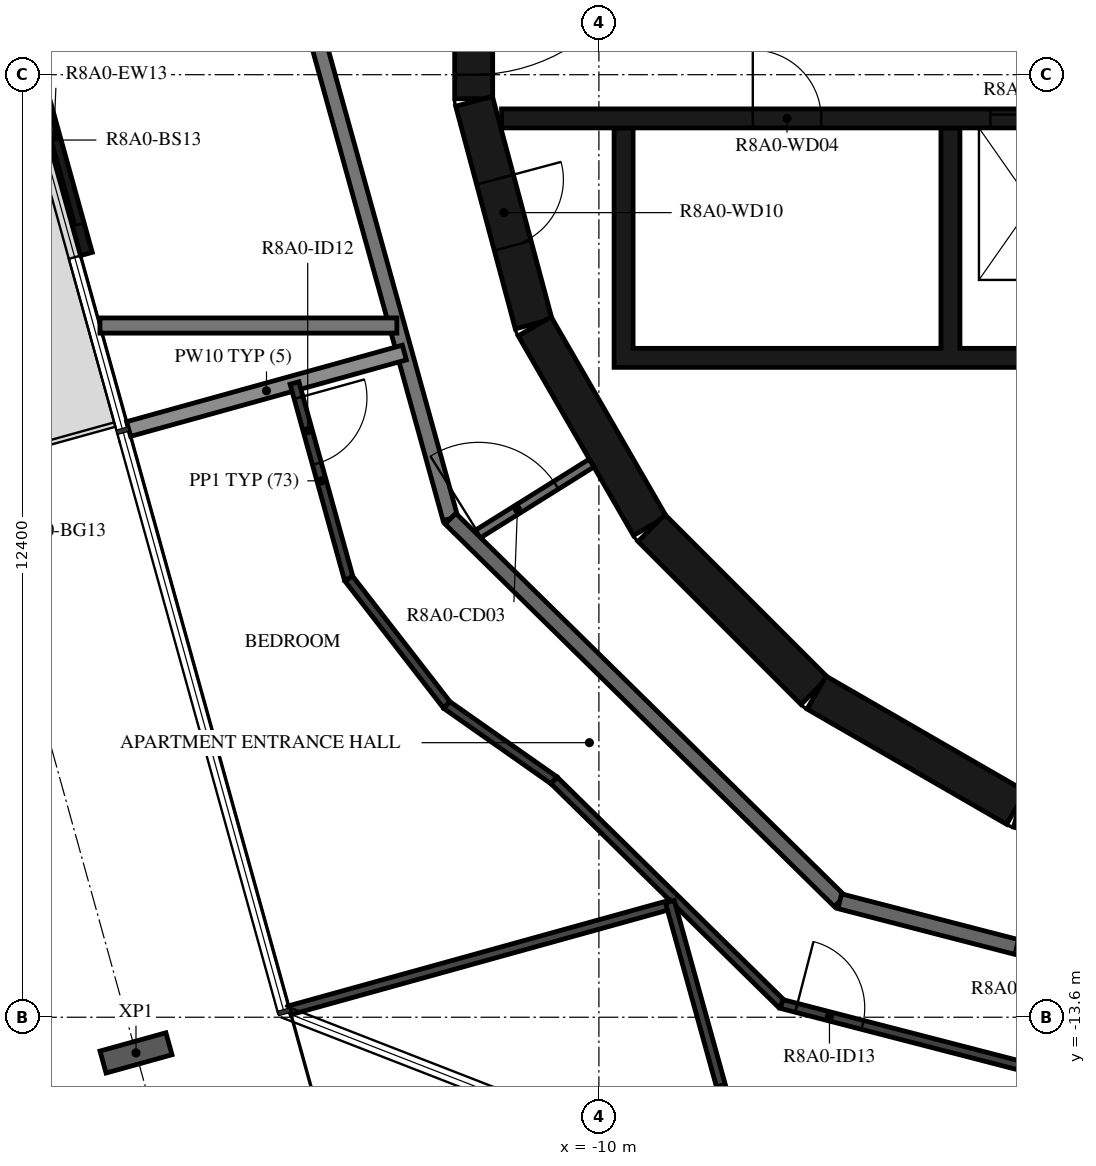
"""IFC4 building model, lengths in metres.
Left out: names, types, materials, properties, quantities, classifications, styles, units other than length and angle.
Written with IfcOpenShell. Run it as: python <this file> out.ifc"""

import sys

from ifc_helpers import new_model, si_unit, direction, frame, frame_2d, origin, origin_2d, place, context, subcontext, project, spatial, polyline, rectangle, i_section, outline, extrude, element, fill, save


model = new_model("IFC4")
c1 = context("Model", 3, precision=1e-05, world=origin(), true_north=direction((0.0, 1.0)))
c2 = subcontext(c1, "Body", "Model", "MODEL_VIEW")
j1 = project(units=[si_unit("LENGTHUNIT", "METRE"), si_unit("PLANEANGLEUNIT", "RADIAN")], contexts=[c1])
p1 = place(None, origin())
s1 = spatial("IfcSite", under=j1, at=p1, CompositionType="ELEMENT")
p2 = place(p1, origin())
s2 = spatial("IfcBuilding", under=s1, at=p2, CompositionType="ELEMENT")
p3 = place(p2, frame((0.0, 0.0, 305.2)))
s3 = spatial("IfcBuildingStorey", under=s2, at=p3, CompositionType="ELEMENT", Elevation=305.2)
p4 = place(p3, frame((-16.09, -14.069, -0.38), z_axis=(0.0, 0.0, 1.0), x_axis=(-0.267238143562, 0.963630517691, 0.0)))
e1 = element("IfcColumn", 1, at=p4, inside=s3, PredefinedType="COLUMN", context=c2, shape_type="SweptSolid", body=[
    extrude(i_section(OverallWidth=0.3, OverallDepth=0.9, WebThickness=0.019, FlangeThickness=0.035, FilletRadius=0.03, at=origin_2d()), origin(), (0.0, 0.0, 1.0), 3.5),
])
p5 = place(p3, frame((-17.598, -0.475, 0.0), z_axis=(0.0, 0.0, 1.0), x_axis=(0.267266077957, -0.963622770369, 0.0)))
e2 = element("IfcWall", 2, at=p5, inside=s3, PredefinedType="STANDARD", context=c2, shape_type="SweptSolid", body=[
    extrude(rectangle(XDim=3.2, YDim=0.16, at=frame_2d((1.6, 0.0))), origin(), (0.0, 0.0, 1.0), 3.12),
])
p6 = place(p5, frame((0.4, 0.0, 0.0)))
e3 = element("IfcOpeningElement", 3, at=p6, cuts=e2, PredefinedType="OPENING", context=c2, shape_type="SweptSolid", body=[
    extrude(rectangle(XDim=2.4, YDim=2.4, at=frame_2d((1.2, 1.2))), frame((0.0, 0.09, 0.0), z_axis=(0.0, -1.0, 0.0), x_axis=(1.0, 0.0, 0.0)), (0.0, 0.0, 1.0), 0.18),
])
p7 = place(p3, frame((-11.647, 1.516, 0.0), z_axis=(0.0, 0.0, 1.0), x_axis=(0.0, -1.0, 0.0)))
e4 = element("IfcWall", 4, at=p7, inside=s3, PredefinedType="SHEAR", context=c2, shape_type="SweptSolid", body=[
    extrude(rectangle(XDim=3.033, YDim=0.5, at=frame_2d((1.516, 0.0))), origin(), (0.0, 0.0, 1.0), 3.12),
])
p8 = place(p7, frame((0.316, 0.0, 0.0)))
e5 = element("IfcOpeningElement", 5, at=p8, cuts=e4, PredefinedType="OPENING", context=c2, shape_type="SweptSolid", body=[
    extrude(rectangle(XDim=2.4, YDim=2.1, at=frame_2d((1.2, 1.05))), frame((0.0, 0.26, 0.0), z_axis=(0.0, -1.0, 0.0), x_axis=(1.0, 0.0, 0.0)), (0.0, 0.0, 1.0), 0.52),
])
p9 = place(p3, frame((-11.643, -1.55, 0.0), z_axis=(0.0, 0.0, 1.0), x_axis=(0.258734743916, -0.965948410781, 0.0)))
e6 = element("IfcWall", 6, at=p9, inside=s3, PredefinedType="SHEAR", context=c2, shape_type="SweptSolid", body=[
    extrude(rectangle(XDim=3.033, YDim=0.5, at=frame_2d((1.516, 0.0))), origin(), (0.0, 0.0, 1.0), 3.12),
])
p10 = place(p9, frame((1.066, 0.0, 0.0)))
e7 = element("IfcOpeningElement", 7, at=p10, cuts=e6, PredefinedType="OPENING", context=c2, shape_type="SweptSolid", body=[
    extrude(rectangle(XDim=0.9, YDim=2.1, at=frame_2d((0.45, 1.05))), frame((0.0, 0.26, 0.0), z_axis=(0.0, -1.0, 0.0), x_axis=(1.0, 0.0, 0.0)), (0.0, 0.0, 1.0), 0.52),
])
p11 = place(p3, frame((-10.845, -4.51, 0.0), z_axis=(0.0, 0.0, 1.0), x_axis=(0.500087131594, -0.865975092491, 0.0)))
e8 = element("IfcWall", 8, at=p11, inside=s3, PredefinedType="SHEAR", context=c2, shape_type="SweptSolid", body=[
    extrude(rectangle(XDim=3.033, YDim=0.5, at=frame_2d((1.516, 0.0))), origin(), (0.0, 0.0, 1.0), 3.12),
])
p12 = place(p3, frame((-9.308, -7.164, 0.0), z_axis=(0.0, 0.0, 1.0), x_axis=(0.707106781187, -0.707106781187, 0.0)))
e9 = element("IfcWall", 9, at=p12, inside=s3, PredefinedType="SHEAR", context=c2, shape_type="SweptSolid", body=[
    extrude(rectangle(XDim=3.032, YDim=0.5, at=frame_2d((1.516, 0.0))), origin(), (0.0, 0.0, 1.0), 3.12),
])
for number, where, z_axis, x_axis in (
    (10, (-7.137, -9.329, 0.0), (0.0, 0.0, 1.0), (0.866, -0.5, 0.0)),
    (11, (-4.479, -10.858, 0.0), (0.0, 0.0, 1.0), (0.966, -0.259, 0.0)),
):
    element("IfcWall", number, at=place(p3, frame(where, z_axis=z_axis, x_axis=x_axis)), inside=s3, PredefinedType="SHEAR", context=c2, shape_type="SweptSolid", body=[
        extrude(rectangle(XDim=3.033, YDim=0.5, at=frame_2d((1.516, 0.0))), origin(), (0.0, 0.0, 1.0), 3.12),
    ])
p13 = place(p3, origin())
e12 = element("IfcWall", 12, at=p13, inside=s3, PredefinedType="SHEAR", context=c2, shape_type="SweptSolid", body=[
    extrude(outline(polyline([(9.8, -5.05), (9.8, -4.8), (9.8, -1.9), (9.55, -1.9), (9.55, -4.8), (7.65, -4.8), (7.65, -1.9), (7.4, -1.9), (7.4, -4.8), (5.5, -4.8), (5.5, -1.9), (5.25, -1.9), (5.25, -4.8), (3.35, -4.8), (3.35, -1.9), (3.1, -1.9), (3.1, -4.8), (1.2, -4.8), (1.2, -1.9), (0.95, -1.9), (0.95, -4.8), (-0.95, -4.8), (-0.95, -1.9), (-1.2, -1.9), (-1.2, -4.8), (-3.1, -4.8), (-3.1, -1.9), (-3.35, -1.9), (-3.35, -4.8), (-5.25, -4.8), (-5.25, -1.9), (-5.5, -1.9), (-5.5, -4.8), (-9.55, -4.8), (-9.55, -1.9), (-9.8, -1.9), (-9.8, -4.8), (-9.8, -5.05), (9.8, -5.05)])), origin(), (0.0, 0.0, 1.0), 3.12),
])
p14 = place(p3, frame((-11.28, -1.775, 0.0), z_axis=(0.0, 0.0, 1.0), x_axis=(1.0, 0.0, 0.0)))
e13 = element("IfcWall", 13, at=p14, inside=s3, PredefinedType="SHEAR", context=c2, shape_type="SweptSolid", body=[
    extrude(rectangle(XDim=14.38, YDim=0.25, at=frame_2d((7.19, 0.0))), origin(), (0.0, 0.0, 1.0), 3.12),
])
p15 = place(p14, frame((6.43, 0.0, 0.0)))
e14 = element("IfcOpeningElement", 14, at=p15, cuts=e13, PredefinedType="OPENING", context=c2, shape_type="SweptSolid", body=[
    extrude(rectangle(XDim=1.1, YDim=2.1, at=frame_2d((0.55, 1.05))), frame((0.0, 0.135, 0.0), z_axis=(0.0, -1.0, 0.0), x_axis=(1.0, 0.0, 0.0)), (0.0, 0.0, 1.0), 0.27),
])
p16 = place(p14, frame((8.58, 0.0, 0.0)))
e15 = element("IfcOpeningElement", 15, at=p16, cuts=e13, PredefinedType="OPENING", context=c2, shape_type="SweptSolid", body=[
    extrude(rectangle(XDim=1.1, YDim=2.1, at=frame_2d((0.55, 1.05))), frame((0.0, 0.135, 0.0), z_axis=(0.0, -1.0, 0.0), x_axis=(1.0, 0.0, 0.0)), (0.0, 0.0, 1.0), 0.27),
])
p17 = place(p14, frame((10.73, 0.0, 0.0)))
e16 = element("IfcOpeningElement", 16, at=p17, cuts=e13, PredefinedType="OPENING", context=c2, shape_type="SweptSolid", body=[
    extrude(rectangle(XDim=1.1, YDim=2.1, at=frame_2d((0.55, 1.05))), frame((0.0, 0.135, 0.0), z_axis=(0.0, -1.0, 0.0), x_axis=(1.0, 0.0, 0.0)), (0.0, 0.0, 1.0), 0.27),
])
p18 = place(p14, frame((3.305, 0.0, 0.0)))
e17 = element("IfcOpeningElement", 17, at=p18, cuts=e13, PredefinedType="OPENING", context=c2, shape_type="SweptSolid", body=[
    extrude(rectangle(XDim=0.9, YDim=2.1, at=frame_2d((0.45, 1.05))), frame((0.0, 0.135, 0.0), z_axis=(0.0, -1.0, 0.0), x_axis=(1.0, 0.0, 0.0)), (0.0, 0.0, 1.0), 0.27),
])
p19 = place(p14, frame((12.98, 0.0, 0.0)))
e18 = element("IfcOpeningElement", 18, at=p19, cuts=e13, PredefinedType="OPENING", context=c2, shape_type="SweptSolid", body=[
    extrude(rectangle(XDim=0.9, YDim=2.1, at=frame_2d((0.45, 1.05))), frame((0.0, 0.135, 0.0), z_axis=(0.0, -1.0, 0.0), x_axis=(1.0, 0.0, 0.0)), (0.0, 0.0, 1.0), 0.27),
])
p20 = place(p3, frame((-11.687, -7.303, 0.0), z_axis=(0.0, 0.0, 1.0), x_axis=(0.848064094072, 0.529893661357, 0.0)))
e19 = element("IfcWall", 19, at=p20, inside=s3, PredefinedType="PARTITIONING", context=c2, shape_type="SweptSolid", body=[
    extrude(rectangle(XDim=1.876, YDim=0.12, at=frame_2d((0.938, 0.0))), origin(), (0.0, 0.0, 1.0), 3.12),
])
p21 = place(p20, frame((0.125, 0.0, 0.0)))
e20 = element("IfcOpeningElement", 20, at=p21, cuts=e19, PredefinedType="OPENING", context=c2, shape_type="SweptSolid", body=[
    extrude(rectangle(XDim=1.2, YDim=2.1, at=frame_2d((0.6, 1.05))), frame((0.0, 0.07, 0.0), z_axis=(0.0, -1.0, 0.0), x_axis=(1.0, 0.0, 0.0)), (0.0, 0.0, 1.0), 0.14),
])
p22 = place(p3, frame((-13.872, -0.121, 0.0), z_axis=(0.0, 0.0, 1.0), x_axis=(0.267254575108, -0.963625960674, 0.0)))
e21 = element("IfcWall", 21, at=p22, inside=s3, PredefinedType="STANDARD", context=c2, shape_type="SweptSolid", body=[
    extrude(rectangle(XDim=7.181, YDim=0.2, at=frame_2d((3.591, 0.0))), origin(), (0.0, 0.0, 1.0), 3.12),
])
p23 = place(p3, frame((-11.953, -7.041, 0.0), z_axis=(0.0, 0.0, 1.0), x_axis=(0.713250549143, -0.70090916255, 0.0)))
e22 = element("IfcWall", 22, at=p23, inside=s3, PredefinedType="STANDARD", context=c2, shape_type="SweptSolid", body=[
    extrude(rectangle(XDim=7.181, YDim=0.2, at=frame_2d((3.59, 0.0))), origin(), (0.0, 0.0, 1.0), 3.12),
])
p24 = place(p3, frame((-6.831, -12.074, 0.0), z_axis=(0.0, 0.0, 1.0), x_axis=(0.968144780225, -0.250391063186, 0.0)))
e23 = element("IfcWall", 23, at=p24, inside=s3, PredefinedType="STANDARD", context=c2, shape_type="SweptSolid", body=[
    extrude(rectangle(XDim=7.181, YDim=0.2, at=frame_2d((3.591, 0.0))), origin(), (0.0, 0.0, 1.0), 3.12),
])
p25 = place(p24, frame((2.39, 0.0, 0.0)))
e24 = element("IfcOpeningElement", 24, at=p25, cuts=e23, PredefinedType="OPENING", context=c2, shape_type="SweptSolid", body=[
    extrude(rectangle(XDim=1.0, YDim=2.1, at=frame_2d((0.5, 1.05))), frame((0.0, 0.11, 0.0), z_axis=(0.0, -1.0, 0.0), x_axis=(1.0, 0.0, 0.0)), (0.0, 0.0, 1.0), 0.22),
])
p26 = place(p24, frame((5.69, 0.0, 0.0)))
e25 = element("IfcOpeningElement", 25, at=p26, cuts=e23, PredefinedType="OPENING", context=c2, shape_type="SweptSolid", body=[
    extrude(rectangle(XDim=1.0, YDim=2.1, at=frame_2d((0.5, 1.05))), frame((0.0, 0.11, 0.0), z_axis=(0.0, -1.0, 0.0), x_axis=(1.0, 0.0, 0.0)), (0.0, 0.0, 1.0), 0.22),
])
p27 = place(p3, frame((-16.564, -4.5, 0.0), z_axis=(0.0, 0.0, 1.0), x_axis=(1.0, 0.0, 0.0)))
e26 = element("IfcWall", 26, at=p27, inside=s3, PredefinedType="STANDARD", context=c2, shape_type="SweptSolid", body=[
    extrude(rectangle(XDim=3.907, YDim=0.2, at=frame_2d((1.953, 0.0))), origin(), (0.0, 0.0, 1.0), 3.12),
])
p28 = place(p3, frame((-16.187, -5.862, 0.0), z_axis=(0.0, 0.0, 1.0), x_axis=(0.963631166683, 0.267235803358, 0.0)))
e27 = element("IfcWall", 27, at=p28, inside=s3, PredefinedType="STANDARD", context=c2, shape_type="SweptSolid", body=[
    extrude(rectangle(XDim=3.765, YDim=0.2, at=frame_2d((1.882, 0.0))), origin(), (0.0, 0.0, 1.0), 2.73),
])
p29 = place(p3, frame((-14.005, -5.256, 0.0), z_axis=(0.0, 0.0, 1.0), x_axis=(0.267200500487, -0.963640956238, 0.0)))
e28 = element("IfcWall", 28, at=p29, inside=s3, PredefinedType="PARTITIONING", context=c2, shape_type="SweptSolid", body=[
    extrude(rectangle(XDim=2.67, YDim=0.12, at=frame_2d((1.335, 0.0))), origin(), (0.0, 0.0, 1.0), 3.12),
])
p30 = place(p29, frame((0.2, 0.0, 0.0)))
e29 = element("IfcOpeningElement", 29, at=p30, cuts=e28, PredefinedType="OPENING", context=c2, shape_type="SweptSolid", body=[
    extrude(rectangle(XDim=0.9, YDim=2.1, at=frame_2d((0.45, 1.05))), frame((0.0, 0.07, 0.0), z_axis=(0.0, -1.0, 0.0), x_axis=(1.0, 0.0, 0.0)), (0.0, 0.0, 1.0), 0.14),
])
p31 = place(p3, frame((-13.291, -7.829, 0.0), z_axis=(0.0, 0.0, 1.0), x_axis=(0.613017069232, -0.790069663277, 0.0)))
e30 = element("IfcWall", 30, at=p31, inside=s3, PredefinedType="PARTITIONING", context=c2, shape_type="SweptSolid", body=[
    extrude(rectangle(XDim=2.106, YDim=0.12, at=frame_2d((1.053, 0.0))), origin(), (0.0, 0.0, 1.0), 3.12),
])
p32 = place(p3, frame((-12.0, -9.493, 0.0), z_axis=(0.0, 0.0, 1.0), x_axis=(0.818312362022, -0.57477376259, 0.0)))
e31 = element("IfcWall", 31, at=p32, inside=s3, PredefinedType="PARTITIONING", context=c2, shape_type="SweptSolid", body=[
    extrude(rectangle(XDim=1.723, YDim=0.12, at=frame_2d((0.862, 0.0))), origin(), (0.0, 0.0, 1.0), 3.12),
])
p33 = place(p3, frame((-10.59, -10.483, 0.0), z_axis=(0.0, 0.0, 1.0), x_axis=(0.713244109461, -0.70091571556, 0.0)))
e32 = element("IfcWall", 32, at=p33, inside=s3, PredefinedType="PARTITIONING", context=c2, shape_type="SweptSolid", body=[
    extrude(rectangle(XDim=4.198, YDim=0.12, at=frame_2d((2.099, 0.0))), origin(), (0.0, 0.0, 1.0), 3.12),
])
p34 = place(p3, frame((-7.596, -13.426, 0.0), z_axis=(0.0, 0.0, 1.0), x_axis=(0.96815406745, -0.250355151095, 0.0)))
e33 = element("IfcWall", 33, at=p34, inside=s3, PredefinedType="PARTITIONING", context=c2, shape_type="SweptSolid", body=[
    extrude(rectangle(XDim=3.992, YDim=0.12, at=frame_2d((1.996, 0.0))), origin(), (0.0, 0.0, 1.0), 3.12),
])
p35 = place(p34, frame((0.2, 0.0, 0.0)))
e34 = element("IfcOpeningElement", 34, at=p35, cuts=e33, PredefinedType="OPENING", context=c2, shape_type="SweptSolid", body=[
    extrude(rectangle(XDim=0.9, YDim=2.1, at=frame_2d((0.45, 1.05))), frame((0.0, 0.07, 0.0), z_axis=(0.0, -1.0, 0.0), x_axis=(1.0, 0.0, 0.0)), (0.0, 0.0, 1.0), 0.14),
])
p36 = place(p3, frame((-14.066, -13.508, 0.0), z_axis=(0.0, 0.0, 1.0), x_axis=(0.963643585504, 0.267191018032, 0.0)))
e35 = element("IfcWall", 35, at=p36, inside=s3, PredefinedType="PARTITIONING", context=c2, shape_type="SweptSolid", body=[
    extrude(rectangle(XDim=5.2, YDim=0.12, at=frame_2d((2.6, 0.0))), origin(), (0.0, 0.0, 1.0), 2.73),
])
p37 = place(p3, frame((-7.368, -18.202, 0.0), z_axis=(0.0, 0.0, 1.0), x_axis=(-0.26723158658, 0.963632336077, 0.0)))
e36 = element("IfcWall", 36, at=p37, inside=s3, PredefinedType="PARTITIONING", context=c2, shape_type="SweptSolid", body=[
    extrude(rectangle(XDim=6.353, YDim=0.12, at=frame_2d((3.177, 0.0))), origin(), (0.0, 0.0, 1.0), 3.12),
])
p38 = place(p37, frame((2.956, 0.0, 0.0)))
e37 = element("IfcOpeningElement", 37, at=p38, cuts=e36, PredefinedType="OPENING", context=c2, shape_type="SweptSolid", body=[
    extrude(rectangle(XDim=0.9, YDim=2.1, at=frame_2d((0.45, 1.05))), frame((0.0, 0.07, 0.0), z_axis=(0.0, -1.0, 0.0), x_axis=(1.0, 0.0, 0.0)), (0.0, 0.0, 1.0), 0.14),
])
p39 = place(p6, origin())
e38 = element("IfcDoor", 38, at=p39, inside=s3, OperationType="DOUBLE_DOOR_SLIDING", PredefinedType="DOOR", context=c2, shape_type="SweptSolid", body=[
    extrude(rectangle(XDim=2.4, YDim=2.4, at=frame_2d((1.2, 1.2))), frame((0.0, 0.025, 0.0), z_axis=(0.0, -1.0, 0.0), x_axis=(1.0, 0.0, 0.0)), (0.0, 0.0, 1.0), 0.05),
])
fill(e3, e38)
p40 = place(p8, origin())
e39 = element("IfcDoor", 39, at=p40, inside=s3, OperationType="DOUBLE_DOOR_SINGLE_SWING", PredefinedType="DOOR", context=c2, shape_type="SweptSolid", body=[
    extrude(rectangle(XDim=2.4, YDim=2.1, at=frame_2d((1.2, 1.05))), frame((0.0, 0.025, 0.0), z_axis=(0.0, -1.0, 0.0), x_axis=(1.0, 0.0, 0.0)), (0.0, 0.0, 1.0), 0.05),
])
fill(e5, e39)
p41 = place(p15, origin())
e40 = element("IfcDoor", 40, at=p41, inside=s3, OperationType="DOUBLE_DOOR_SLIDING", PredefinedType="DOOR", context=c2, shape_type="SweptSolid", body=[
    extrude(rectangle(XDim=1.1, YDim=2.1, at=frame_2d((0.55, 1.05))), frame((0.0, 0.025, 0.0), z_axis=(0.0, -1.0, 0.0), x_axis=(1.0, 0.0, 0.0)), (0.0, 0.0, 1.0), 0.05),
])
fill(e14, e40)
p42 = place(p18, origin())
e41 = element("IfcDoor", 41, at=p42, inside=s3, OperationType="SINGLE_SWING_RIGHT", PredefinedType="DOOR", context=c2, shape_type="SweptSolid", body=[
    extrude(rectangle(XDim=0.9, YDim=2.1, at=frame_2d((0.45, 1.05))), frame((0.0, 0.025, 0.0), z_axis=(0.0, -1.0, 0.0), x_axis=(1.0, 0.0, 0.0)), (0.0, 0.0, 1.0), 0.05),
])
fill(e17, e41)
p43 = place(p10, origin())
e42 = element("IfcDoor", 42, at=p43, inside=s3, OperationType="SINGLE_SWING_RIGHT", PredefinedType="DOOR", context=c2, shape_type="SweptSolid", body=[
    extrude(rectangle(XDim=0.9, YDim=2.1, at=frame_2d((0.45, 1.05))), frame((0.0, 0.025, 0.0), z_axis=(0.0, -1.0, 0.0), x_axis=(1.0, 0.0, 0.0)), (0.0, 0.0, 1.0), 0.05),
])
fill(e7, e42)
p44 = place(p25, origin())
e43 = element("IfcDoor", 43, at=p44, inside=s3, OperationType="SINGLE_SWING_RIGHT", PredefinedType="DOOR", context=c2, shape_type="SweptSolid", body=[
    extrude(rectangle(XDim=1.0, YDim=2.1, at=frame_2d((0.5, 1.05))), frame((0.0, 0.025, 0.0), z_axis=(0.0, -1.0, 0.0), x_axis=(1.0, 0.0, 0.0)), (0.0, 0.0, 1.0), 0.05),
])
fill(e24, e43)
p45 = place(p30, origin())
e44 = element("IfcDoor", 44, at=p45, inside=s3, OperationType="SINGLE_SWING_RIGHT", PredefinedType="DOOR", context=c2, shape_type="SweptSolid", body=[
    extrude(rectangle(XDim=0.9, YDim=2.1, at=frame_2d((0.45, 1.05))), frame((0.0, 0.025, 0.0), z_axis=(0.0, -1.0, 0.0), x_axis=(1.0, 0.0, 0.0)), (0.0, 0.0, 1.0), 0.05),
])
fill(e29, e44)
p46 = place(p35, origin())
e45 = element("IfcDoor", 45, at=p46, inside=s3, OperationType="SINGLE_SWING_RIGHT", PredefinedType="DOOR", context=c2, shape_type="SweptSolid", body=[
    extrude(rectangle(XDim=0.9, YDim=2.1, at=frame_2d((0.45, 1.05))), frame((0.0, 0.025, 0.0), z_axis=(0.0, -1.0, 0.0), x_axis=(1.0, 0.0, 0.0)), (0.0, 0.0, 1.0), 0.05),
])
fill(e34, e45)
p47 = place(p38, origin())
e46 = element("IfcDoor", 46, at=p47, inside=s3, OperationType="SINGLE_SWING_RIGHT", PredefinedType="DOOR", context=c2, shape_type="SweptSolid", body=[
    extrude(rectangle(XDim=0.9, YDim=2.1, at=frame_2d((0.45, 1.05))), frame((0.0, 0.025, 0.0), z_axis=(0.0, -1.0, 0.0), x_axis=(1.0, 0.0, 0.0)), (0.0, 0.0, 1.0), 0.05),
])
fill(e37, e46)
p48 = place(p21, origin())
e47 = element("IfcDoor", 47, at=p48, inside=s3, OperationType="DOUBLE_DOOR_SINGLE_SWING", PredefinedType="DOOR", context=c2, shape_type="SweptSolid", body=[
    extrude(rectangle(XDim=1.2, YDim=2.1, at=frame_2d((0.6, 1.05))), frame((0.0, 0.025, 0.0), z_axis=(0.0, -1.0, 0.0), x_axis=(1.0, 0.0, 0.0)), (0.0, 0.0, 1.0), 0.05),
])
fill(e20, e47)
save(model, sys.argv[1])
